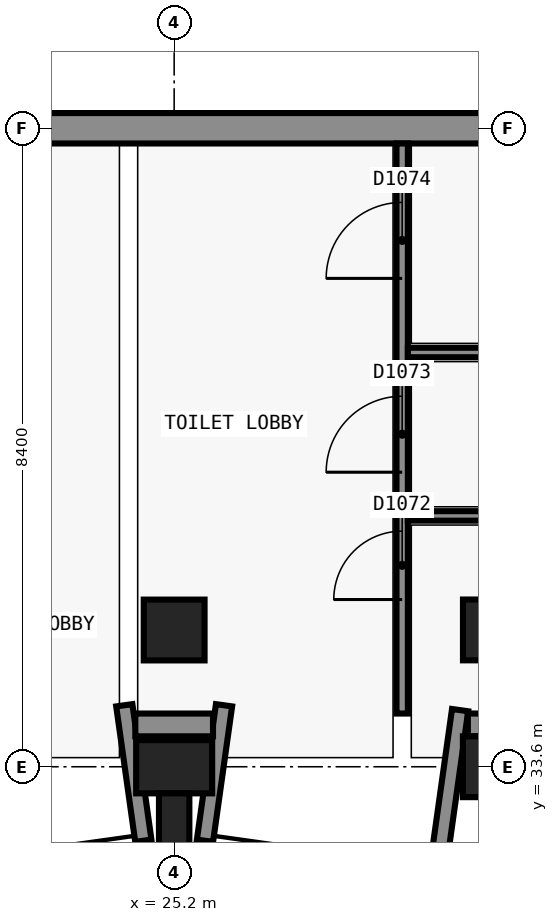
"""IFC4 building model, lengths in metres.
Left out: names, types, materials, properties, quantities, classifications, styles, units other than length and angle.
Written with IfcOpenShell. Run it as: python <this file> out.ifc"""

import sys

from ifc_helpers import new_model, si_unit, direction, frame, frame_2d, origin, origin_2d, place, context, subcontext, project, spatial, rectangle, extrude, element, fill, save


model = new_model("IFC4")
c1 = context("Model", 3, precision=1e-05, world=origin(), true_north=direction((0.0, 1.0)))
c2 = subcontext(c1, "Body", "Model", "MODEL_VIEW")
j1 = project(units=[si_unit("LENGTHUNIT", "METRE"), si_unit("PLANEANGLEUNIT", "RADIAN")], contexts=[c1])
p1 = place(None, origin())
s1 = spatial("IfcSite", under=j1, at=p1, CompositionType="ELEMENT")
p2 = place(p1, origin())
s2 = spatial("IfcBuilding", under=s1, at=p2, CompositionType="ELEMENT")
p3 = place(p2, frame((0.0, 0.0, 5.4)))
s3 = spatial("IfcBuildingStorey", under=s2, at=p3, CompositionType="ELEMENT", Elevation=5.4)
p4 = place(p3, frame((33.6, 42.0, 0.0), z_axis=(0.0, 0.0, 1.0), x_axis=(-1.0, 0.0, 0.0)))
e1 = element("IfcWall", 1, at=p4, inside=s3, PredefinedType="SHEAR", context=c2, shape_type="SweptSolid", body=[
    extrude(rectangle(XDim=16.6, YDim=0.4, at=frame_2d((8.3, 0.0))), origin(), (0.0, 0.0, 1.0), 4.8),
])
p5 = place(p3, frame((25.2, 33.6, 0.0), z_axis=(0.0, 0.0, 1.0), x_axis=(1.0, 0.0, 0.0)))
e2 = element("IfcColumn", 2, at=p5, inside=s3, PredefinedType="COLUMN", context=c2, shape_type="SweptSolid", body=[
    extrude(rectangle(XDim=1.0, YDim=0.7, at=origin_2d()), origin(), (0.0, 0.0, 1.0), 4.8),
])
for number, where, z_axis, x_axis in (
    (3, (25.2, 35.399, 0.0), (0.0, 0.0, 1.0), (1.0, 0.0, 0.0)),
    (4, (29.399, 33.6, 0.0), (0.0, 0.0, 1.0), (1.0, 0.0, 0.0)),
    (5, (29.4, 35.4, 0.0), (0.0, 0.0, 1.0), (1.0, 0.0, 0.0)),
):
    element("IfcColumn", number, at=place(p3, frame(where, z_axis=z_axis, x_axis=x_axis)), inside=s3, PredefinedType="COLUMN", context=c2, shape_type="SweptSolid", body=[
        extrude(rectangle(XDim=0.8, YDim=0.8, at=origin_2d()), origin(), (0.0, 0.0, 1.0), 4.8),
    ])
for number, where, z_axis, x_axis in (
    (6, (24.544, 34.409, 0.0), (0.0, 0.0, 1.0), (0.139, -0.99, 0.0)),
    (7, (25.856, 34.409, 0.0), (0.0, 0.0, 1.0), (-0.139, -0.99, 0.0)),
):
    element("IfcWall", number, at=place(p3, frame(where, z_axis=z_axis, x_axis=x_axis)), inside=s3, PredefinedType="SOLIDWALL", context=c2, shape_type="SweptSolid", body=[
        extrude(rectangle(XDim=1.8, YDim=0.215, at=frame_2d((0.9, 0.0))), origin(), (0.0, 0.0, 1.0), 4.5),
    ])
p6 = place(p3, frame((28.962, 34.345, 0.0), z_axis=(0.0, 0.0, 1.0), x_axis=(-0.139230687381, -0.99025997379, 0.0)))
e8 = element("IfcWall", 8, at=p6, inside=s3, PredefinedType="SOLIDWALL", context=c2, shape_type="SweptSolid", body=[
    extrude(rectangle(XDim=2.169, YDim=0.215, at=frame_2d((1.084, 0.0))), origin(), (0.0, 0.0, 1.0), 4.5),
])
p7 = place(p3, frame((25.711, 34.15, 0.0), z_axis=(0.0, 0.0, 1.0), x_axis=(-1.0, 0.0, 0.0)))
e9 = element("IfcWall", 9, at=p7, inside=s3, PredefinedType="SOLIDWALL", context=c2, shape_type="SweptSolid", body=[
    extrude(rectangle(XDim=1.022, YDim=0.3, at=frame_2d((0.511, 0.0))), origin(), (0.0, 0.0, 1.0), 4.5),
])
p8 = place(p3, frame((33.6, 34.15, 0.0), z_axis=(0.0, 0.0, 1.0), x_axis=(-1.0, 0.0, 0.0)))
e10 = element("IfcWall", 10, at=p8, inside=s3, PredefinedType="SOLIDWALL", context=c2, shape_type="SweptSolid", body=[
    extrude(rectangle(XDim=4.536, YDim=0.3, at=frame_2d((2.268, 0.0))), origin(), (0.0, 0.0, 1.0), 4.5),
])
p9 = place(p8, frame((1.5, 0.0, 1.5)))
e11 = element("IfcOpeningElement", 11, at=p9, cuts=e10, PredefinedType="OPENING", context=c2, shape_type="SweptSolid", body=[
    extrude(rectangle(XDim=1.2, YDim=0.9, at=frame_2d((0.6, 0.45))), frame((0.0, 0.16, 0.0), z_axis=(0.0, -1.0, 0.0), x_axis=(1.0, 0.0, 0.0)), (0.0, 0.0, 1.0), 0.32),
])
p10 = place(p3, frame((25.2, 32.65, 0.0), z_axis=(0.0, 0.0, 1.0), x_axis=(1.0, 0.0, 0.0)))
e12 = element("IfcColumn", 12, at=p10, inside=s3, PredefinedType="PILASTER", context=c2, shape_type="SweptSolid", body=[
    extrude(rectangle(XDim=0.4, YDim=1.2, at=origin_2d()), origin(), (0.0, 0.0, 1.0), 4.8),
])
p11 = place(p3, frame((28.2, 34.3, 0.0), z_axis=(0.0, 0.0, 1.0), x_axis=(0.0, 1.0, 0.0)))
e13 = element("IfcWall", 13, at=p11, inside=s3, PredefinedType="PARTITIONING", context=c2, shape_type="SweptSolid", body=[
    extrude(rectangle(XDim=7.5, YDim=0.15, at=frame_2d((3.75, 0.0))), origin(), (0.0, 0.0, 1.0), 4.5),
])
p12 = place(p11, frame((1.5, 0.0, 0.0)))
e14 = element("IfcOpeningElement", 14, at=p12, cuts=e13, PredefinedType="OPENING", context=c2, shape_type="SweptSolid", body=[
    extrude(rectangle(XDim=0.9, YDim=2.1, at=frame_2d((0.45, 1.05))), frame((0.0, 0.085, 0.0), z_axis=(0.0, -1.0, 0.0), x_axis=(1.0, 0.0, 0.0)), (0.0, 0.0, 1.0), 0.17),
])
p13 = place(p11, frame((3.175, 0.0, 0.0)))
e15 = element("IfcOpeningElement", 15, at=p13, cuts=e13, PredefinedType="OPENING", context=c2, shape_type="SweptSolid", body=[
    extrude(rectangle(XDim=1.0, YDim=2.1, at=frame_2d((0.5, 1.05))), frame((0.0, 0.085, 0.0), z_axis=(0.0, -1.0, 0.0), x_axis=(1.0, 0.0, 0.0)), (0.0, 0.0, 1.0), 0.17),
])
p14 = place(p11, frame((5.725, 0.0, 0.0)))
e16 = element("IfcOpeningElement", 16, at=p14, cuts=e13, PredefinedType="OPENING", context=c2, shape_type="SweptSolid", body=[
    extrude(rectangle(XDim=1.0, YDim=2.1, at=frame_2d((0.5, 1.05))), frame((0.0, 0.085, 0.0), z_axis=(0.0, -1.0, 0.0), x_axis=(1.0, 0.0, 0.0)), (0.0, 0.0, 1.0), 0.17),
])
for number, where, z_axis, x_axis in (
    (17, (28.275, 36.9, 0.0), (0.0, 0.0, 1.0), (1.0, 0.0, 0.0)),
    (18, (28.275, 39.05, 0.0), (0.0, 0.0, 1.0), (1.0, 0.0, 0.0)),
):
    element("IfcWall", number, at=place(p3, frame(where, z_axis=z_axis, x_axis=x_axis)), inside=s3, PredefinedType="PARTITIONING", context=c2, shape_type="SweptSolid", body=[
        extrude(rectangle(XDim=5.388, YDim=0.125, at=frame_2d((2.694, 0.0))), origin(), (0.0, 0.0, 1.0), 3.8),
    ])
p15 = place(p12, origin())
e19 = element("IfcDoor", 19, at=p15, inside=s3, OperationType="SINGLE_SWING_RIGHT", PredefinedType="DOOR", context=c2, shape_type="SweptSolid", body=[
    extrude(rectangle(XDim=0.9, YDim=2.1, at=frame_2d((0.45, 1.05))), frame((0.0, 0.025, 0.0), z_axis=(0.0, -1.0, 0.0), x_axis=(1.0, 0.0, 0.0)), (0.0, 0.0, 1.0), 0.05),
])
fill(e14, e19)
p16 = place(p13, origin())
e20 = element("IfcDoor", 20, at=p16, inside=s3, OperationType="SINGLE_SWING_LEFT", PredefinedType="DOOR", context=c2, shape_type="SweptSolid", body=[
    extrude(rectangle(XDim=1.0, YDim=2.1, at=frame_2d((0.5, 1.05))), frame((0.0, 0.025, 0.0), z_axis=(0.0, -1.0, 0.0), x_axis=(1.0, 0.0, 0.0)), (0.0, 0.0, 1.0), 0.05),
])
fill(e15, e20)
p17 = place(p14, origin())
e21 = element("IfcDoor", 21, at=p17, inside=s3, OperationType="SINGLE_SWING_RIGHT", PredefinedType="DOOR", context=c2, shape_type="SweptSolid", body=[
    extrude(rectangle(XDim=1.0, YDim=2.1, at=frame_2d((0.5, 1.05))), frame((0.0, 0.025, 0.0), z_axis=(0.0, -1.0, 0.0), x_axis=(1.0, 0.0, 0.0)), (0.0, 0.0, 1.0), 0.05),
])
fill(e16, e21)
save(model, sys.argv[1])
